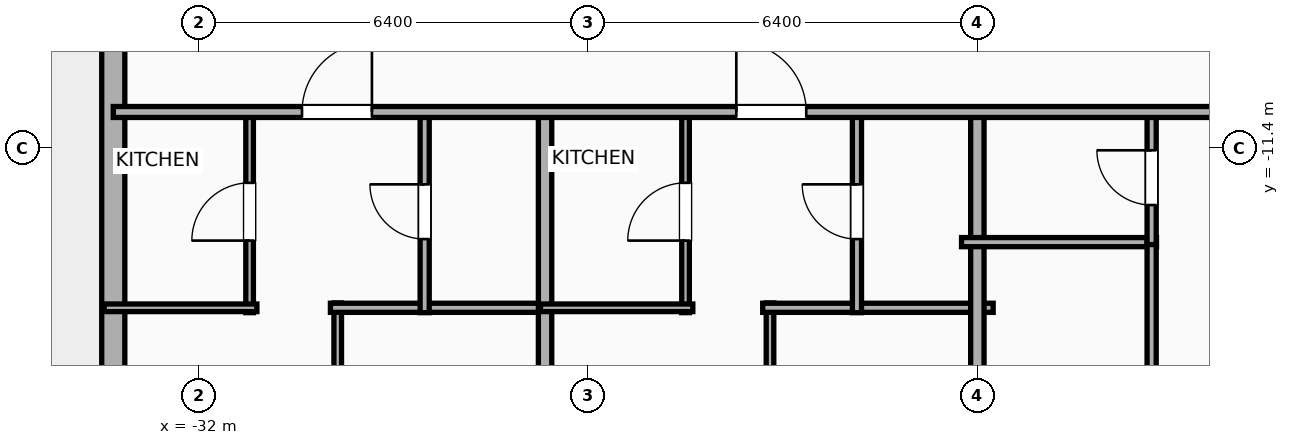
"""IFC4 building model, lengths in metres.
Left out: names, types, materials, properties, quantities, classifications, styles, units other than length and angle.
Written with IfcOpenShell. Run it as: python <this file> out.ifc"""

import sys

from ifc_helpers import new_model, si_unit, direction, frame, frame_2d, origin, place, context, subcontext, project, spatial, rectangle, extrude, element, fill, save


model = new_model("IFC4")
c1 = context("Model", 3, precision=1e-05, world=origin(), true_north=direction((0.0, 1.0)))
c2 = subcontext(c1, "Body", "Model", "MODEL_VIEW")
j1 = project(units=[si_unit("LENGTHUNIT", "METRE"), si_unit("PLANEANGLEUNIT", "RADIAN")], contexts=[c1])
p1 = place(None, origin())
s1 = spatial("IfcSite", under=j1, at=p1, CompositionType="ELEMENT")
p2 = place(p1, origin())
s2 = spatial("IfcBuilding", under=s1, at=p2, CompositionType="ELEMENT")
p3 = place(p2, frame((0.0, 0.0, 53.3)))
s3 = spatial("IfcBuildingStorey", under=s2, at=p3, CompositionType="ELEMENT", Elevation=53.3)
p4 = place(p3, frame((-33.41, -18.381, 0.0), z_axis=(0.0, 0.0, 1.0), x_axis=(0.0, 1.0, 0.0)))
e1 = element("IfcWall", 1, at=p4, inside=s3, PredefinedType="ELEMENTEDWALL", context=c2, shape_type="SweptSolid", body=[
    extrude(rectangle(XDim=36.763, YDim=0.38, at=frame_2d((18.381, 0.0))), origin(), (0.0, 0.0, 1.0), 3.65),
])
p5 = place(p4, frame((17.631, 0.0, 0.0)))
e2 = element("IfcOpeningElement", 2, at=p5, cuts=e1, PredefinedType="OPENING", context=c2, shape_type="SweptSolid", body=[
    extrude(rectangle(XDim=1.5, YDim=2.05, at=frame_2d((0.75, 1.025))), frame((0.0, 0.2, 0.0), z_axis=(0.0, -1.0, 0.0), x_axis=(1.0, 0.0, 0.0)), (0.0, 0.0, 1.0), 0.4),
])
p6 = place(p4, frame((33.207, 0.0, 0.75)))
e3 = element("IfcOpeningElement", 3, at=p6, cuts=e1, PredefinedType="OPENING", context=c2, shape_type="SweptSolid", body=[
    extrude(rectangle(XDim=1.2, YDim=2.05, at=frame_2d((0.6, 1.025))), frame((0.0, 0.2, 0.0), z_axis=(0.0, -1.0, 0.0), x_axis=(1.0, 0.0, 0.0)), (0.0, 0.0, 1.0), 0.4),
])
p7 = place(p3, frame((-29.719, -22.335, 0.0), z_axis=(0.0, 0.0, 1.0), x_axis=(0.0, 1.0, 0.0)))
e4 = element("IfcWall", 4, at=p7, inside=s3, PredefinedType="PARTITIONING", context=c2, shape_type="SweptSolid", body=[
    extrude(rectangle(XDim=8.396, YDim=0.125, at=frame_2d((4.198, 0.0))), origin(), (0.0, 0.0, 1.0), 2.94),
])
p8 = place(p7, frame((5.931, 0.0, 0.0)))
e5 = element("IfcOpeningElement", 5, at=p8, cuts=e4, PredefinedType="OPENING", context=c2, shape_type="SweptSolid", body=[
    extrude(rectangle(XDim=0.9, YDim=2.05, at=frame_2d((0.45, 1.025))), frame((0.0, 0.073, 0.0), z_axis=(0.0, -1.0, 0.0), x_axis=(1.0, 0.0, 0.0)), (0.0, 0.0, 1.0), 0.145),
])
p9 = place(p3, frame((-29.839, -14.02, 0.0), z_axis=(0.0, 0.0, 1.0), x_axis=(1.0, 0.0, 0.0)))
e6 = element("IfcWall", 6, at=p9, inside=s3, PredefinedType="PLUMBINGWALL", context=c2, shape_type="SweptSolid", body=[
    extrude(rectangle(XDim=3.605, YDim=0.15, at=frame_2d((1.803, 0.0))), origin(), (0.0, 0.0, 1.0), 3.65),
])
p10 = place(p3, frame((-31.168, -14.1, 0.0), z_axis=(0.0, 0.0, 1.0), x_axis=(0.0, 1.0, 0.0)))
e7 = element("IfcWall", 7, at=p10, inside=s3, PredefinedType="PARTITIONING", context=c2, shape_type="SweptSolid", body=[
    extrude(rectangle(XDim=3.32, YDim=0.125, at=frame_2d((1.66, 0.0))), origin(), (0.0, 0.0, 1.0), 2.94),
])
p11 = place(p10, frame((1.185, 0.0, 0.0)))
e8 = element("IfcOpeningElement", 8, at=p11, cuts=e7, PredefinedType="OPENING", context=c2, shape_type="SweptSolid", body=[
    extrude(rectangle(XDim=0.95, YDim=2.05, at=frame_2d((0.475, 1.025))), frame((0.0, 0.073, 0.0), z_axis=(0.0, -1.0, 0.0), x_axis=(1.0, 0.0, 0.0)), (0.0, 0.0, 1.0), 0.145),
])
p12 = place(p3, frame((-33.56, -14.02, 0.0), z_axis=(0.0, 0.0, 1.0), x_axis=(1.0, 0.0, 0.0)))
e9 = element("IfcWall", 9, at=p12, inside=s3, PredefinedType="PARTITIONING", context=c2, shape_type="SweptSolid", body=[
    extrude(rectangle(XDim=2.512, YDim=0.125, at=frame_2d((1.256, 0.0))), origin(), (0.0, 0.0, 1.0), 3.65),
])
p13 = place(p3, frame((-28.289, -14.1, 0.0), z_axis=(0.0, 0.0, 1.0), x_axis=(0.0, 1.0, 0.0)))
e10 = element("IfcWall", 10, at=p13, inside=s3, PredefinedType="PLUMBINGWALL", context=c2, shape_type="SweptSolid", body=[
    extrude(rectangle(XDim=3.32, YDim=0.15, at=frame_2d((1.66, 0.0))), origin(), (0.0, 0.0, 1.0), 3.65),
])
p14 = place(p13, frame((1.21, 0.0, 0.0)))
e11 = element("IfcOpeningElement", 11, at=p14, cuts=e10, PredefinedType="OPENING", context=c2, shape_type="SweptSolid", body=[
    extrude(rectangle(XDim=0.9, YDim=2.05, at=frame_2d((0.45, 1.025))), frame((0.0, 0.085, 0.0), z_axis=(0.0, -1.0, 0.0), x_axis=(1.0, 0.0, 0.0)), (0.0, 0.0, 1.0), 0.17),
])
p15 = place(p3, frame((-26.309, -22.21, 0.0), z_axis=(0.0, 0.0, 1.0), x_axis=(0.0, 1.0, 0.0)))
e12 = element("IfcWall", 12, at=p15, inside=s3, PredefinedType="PARTITIONING", context=c2, shape_type="SweptSolid", body=[
    extrude(rectangle(XDim=11.49, YDim=0.22, at=frame_2d((5.745, 0.0))), origin(), (0.0, 0.0, 1.0), 3.65),
])
p16 = place(p3, frame((-22.61, -22.36, 0.0), z_axis=(0.0, 0.0, 1.0), x_axis=(0.0, 1.0, 0.0)))
e13 = element("IfcWall", 13, at=p16, inside=s3, PredefinedType="PARTITIONING", context=c2, shape_type="SweptSolid", body=[
    extrude(rectangle(XDim=8.42, YDim=0.125, at=frame_2d((4.21, 0.0))), origin(), (0.0, 0.0, 1.0), 3.65),
])
p17 = place(p16, frame((5.949, 0.0, 0.0)))
e14 = element("IfcOpeningElement", 14, at=p17, cuts=e13, PredefinedType="OPENING", context=c2, shape_type="SweptSolid", body=[
    extrude(rectangle(XDim=0.9, YDim=2.05, at=frame_2d((0.45, 1.025))), frame((0.0, 0.073, 0.0), z_axis=(0.0, -1.0, 0.0), x_axis=(1.0, 0.0, 0.0)), (0.0, 0.0, 1.0), 0.145),
])
p18 = place(p3, frame((-22.73, -14.02, 0.0), z_axis=(0.0, 0.0, 1.0), x_axis=(1.0, 0.0, 0.0)))
e15 = element("IfcWall", 15, at=p18, inside=s3, PredefinedType="PLUMBINGWALL", context=c2, shape_type="SweptSolid", body=[
    extrude(rectangle(XDim=3.79, YDim=0.15, at=frame_2d((1.895, 0.0))), origin(), (0.0, 0.0, 1.0), 3.65),
])
p19 = place(p3, frame((-23.999, -14.1, 0.0), z_axis=(0.0, 0.0, 1.0), x_axis=(0.0, 1.0, 0.0)))
e16 = element("IfcWall", 16, at=p19, inside=s3, PredefinedType="PARTITIONING", context=c2, shape_type="SweptSolid", body=[
    extrude(rectangle(XDim=3.32, YDim=0.125, at=frame_2d((1.66, 0.0))), origin(), (0.0, 0.0, 1.0), 3.65),
])
p20 = place(p19, frame((1.185, 0.0, 0.0)))
e17 = element("IfcOpeningElement", 17, at=p20, cuts=e16, PredefinedType="OPENING", context=c2, shape_type="SweptSolid", body=[
    extrude(rectangle(XDim=0.95, YDim=2.05, at=frame_2d((0.475, 1.025))), frame((0.0, 0.073, 0.0), z_axis=(0.0, -1.0, 0.0), x_axis=(1.0, 0.0, 0.0)), (0.0, 0.0, 1.0), 0.145),
])
p21 = place(p3, frame((-26.384, -14.02, 0.0), z_axis=(0.0, 0.0, 1.0), x_axis=(1.0, 0.0, 0.0)))
e18 = element("IfcWall", 18, at=p21, inside=s3, PredefinedType="PARTITIONING", context=c2, shape_type="SweptSolid", body=[
    extrude(rectangle(XDim=2.505, YDim=0.125, at=frame_2d((1.252, 0.0))), origin(), (0.0, 0.0, 1.0), 3.65),
])
p22 = place(p3, frame((-21.18, -14.1, 0.0), z_axis=(0.0, 0.0, 1.0), x_axis=(0.0, 1.0, 0.0)))
e19 = element("IfcWall", 19, at=p22, inside=s3, PredefinedType="PLUMBINGWALL", context=c2, shape_type="SweptSolid", body=[
    extrude(rectangle(XDim=3.32, YDim=0.15, at=frame_2d((1.66, 0.0))), origin(), (0.0, 0.0, 1.0), 3.65),
])
p23 = place(p22, frame((1.21, 0.0, 0.0)))
e20 = element("IfcOpeningElement", 20, at=p23, cuts=e19, PredefinedType="OPENING", context=c2, shape_type="SweptSolid", body=[
    extrude(rectangle(XDim=0.9, YDim=2.05, at=frame_2d((0.45, 1.025))), frame((0.0, 0.085, 0.0), z_axis=(0.0, -1.0, 0.0), x_axis=(1.0, 0.0, 0.0)), (0.0, 0.0, 1.0), 0.17),
])
p24 = place(p3, frame((-19.2, -22.21, 0.0), z_axis=(0.0, 0.0, 1.0), x_axis=(0.0, 1.0, 0.0)))
e21 = element("IfcWall", 21, at=p24, inside=s3, PredefinedType="PARTITIONING", context=c2, shape_type="SweptSolid", body=[
    extrude(rectangle(XDim=11.49, YDim=0.22, at=frame_2d((5.745, 0.0))), origin(), (0.0, 0.0, 1.0), 2.94),
])
p25 = place(p3, frame((-19.46, -12.94, 0.0), z_axis=(0.0, 0.0, 1.0), x_axis=(1.0, 0.0, 0.0)))
e22 = element("IfcWall", 22, at=p25, inside=s3, PredefinedType="PLUMBINGWALL", context=c2, shape_type="SweptSolid", body=[
    extrude(rectangle(XDim=3.206, YDim=0.15, at=frame_2d((1.603, 0.0))), origin(), (0.0, 0.0, 1.0), 3.65),
])
p26 = place(p3, frame((-16.334, -22.258, 0.0), z_axis=(0.0, 0.0, 1.0), x_axis=(0.0, 1.0, 0.0)))
e23 = element("IfcWall", 23, at=p26, inside=s3, PredefinedType="PLUMBINGWALL", context=c2, shape_type="SweptSolid", body=[
    extrude(rectangle(XDim=9.358, YDim=0.15, at=frame_2d((4.679, 0.0))), origin(), (0.0, 0.0, 1.0), 3.65),
])
p27 = place(p26, frame((6.288, 0.0, 0.0)))
e24 = element("IfcOpeningElement", 24, at=p27, cuts=e23, PredefinedType="OPENING", context=c2, shape_type="SweptSolid", body=[
    extrude(rectangle(XDim=0.9, YDim=2.05, at=frame_2d((0.45, 1.025))), frame((0.0, 0.085, 0.0), z_axis=(0.0, -1.0, 0.0), x_axis=(1.0, 0.0, 0.0)), (0.0, 0.0, 1.0), 0.17),
])
p28 = place(p3, frame((-16.334, -12.98, 0.0), z_axis=(0.0, 0.0, 1.0), x_axis=(0.0, 1.0, 0.0)))
e25 = element("IfcWall", 25, at=p28, inside=s3, PredefinedType="PLUMBINGWALL", context=c2, shape_type="SweptSolid", body=[
    extrude(rectangle(XDim=2.2, YDim=0.15, at=frame_2d((1.1, 0.0))), origin(), (0.0, 0.0, 1.0), 3.65),
])
p29 = place(p28, frame((0.65, 0.0, 0.0)))
e26 = element("IfcOpeningElement", 26, at=p29, cuts=e25, PredefinedType="OPENING", context=c2, shape_type="SweptSolid", body=[
    extrude(rectangle(XDim=0.9, YDim=2.05, at=frame_2d((0.45, 1.025))), frame((0.0, 0.085, 0.0), z_axis=(0.0, -1.0, 0.0), x_axis=(1.0, 0.0, 0.0)), (0.0, 0.0, 1.0), 0.17),
])
p30 = place(p3, frame((-33.41, -10.8, 0.0), z_axis=(0.0, 0.0, 1.0), x_axis=(1.0, 0.0, 0.0)))
e27 = element("IfcWall", 27, at=p30, inside=s3, PredefinedType="PARTITIONING", context=c2, shape_type="SweptSolid", body=[
    extrude(rectangle(XDim=59.62, YDim=0.18, at=frame_2d((29.81, 0.0))), origin(), (0.0, 0.0, 1.0), 3.65),
])
p31 = place(p30, frame((3.104, 0.0, 0.0)))
e28 = element("IfcOpeningElement", 28, at=p31, cuts=e27, PredefinedType="OPENING", context=c2, shape_type="SweptSolid", body=[
    extrude(rectangle(XDim=1.15, YDim=2.05, at=frame_2d((0.575, 1.025))), frame((0.0, 0.1, 0.0), z_axis=(0.0, -1.0, 0.0), x_axis=(1.0, 0.0, 0.0)), (0.0, 0.0, 1.0), 0.2),
])
p32 = place(p30, frame((10.246, 0.0, 0.0)))
e29 = element("IfcOpeningElement", 29, at=p32, cuts=e27, PredefinedType="OPENING", context=c2, shape_type="SweptSolid", body=[
    extrude(rectangle(XDim=1.15, YDim=2.05, at=frame_2d((0.575, 1.025))), frame((0.0, 0.1, 0.0), z_axis=(0.0, -1.0, 0.0), x_axis=(1.0, 0.0, 0.0)), (0.0, 0.0, 1.0), 0.2),
])
p33 = place(p30, frame((18.336, 0.0, 0.0)))
e30 = element("IfcOpeningElement", 30, at=p33, cuts=e27, PredefinedType="OPENING", context=c2, shape_type="SweptSolid", body=[
    extrude(rectangle(XDim=1.15, YDim=2.05, at=frame_2d((0.575, 1.025))), frame((0.0, 0.1, 0.0), z_axis=(0.0, -1.0, 0.0), x_axis=(1.0, 0.0, 0.0)), (0.0, 0.0, 1.0), 0.2),
])
p34 = place(p30, frame((28.287, 0.0, 0.0)))
e31 = element("IfcOpeningElement", 31, at=p34, cuts=e27, PredefinedType="OPENING", context=c2, shape_type="SweptSolid", body=[
    extrude(rectangle(XDim=1.15, YDim=2.05, at=frame_2d((0.575, 1.025))), frame((0.0, 0.1, 0.0), z_axis=(0.0, -1.0, 0.0), x_axis=(1.0, 0.0, 0.0)), (0.0, 0.0, 1.0), 0.2),
])
p35 = place(p30, frame((37.653, 0.0, 0.0)))
e32 = element("IfcOpeningElement", 32, at=p35, cuts=e27, PredefinedType="OPENING", context=c2, shape_type="SweptSolid", body=[
    extrude(rectangle(XDim=1.15, YDim=2.05, at=frame_2d((0.575, 1.025))), frame((0.0, 0.1, 0.0), z_axis=(0.0, -1.0, 0.0), x_axis=(1.0, 0.0, 0.0)), (0.0, 0.0, 1.0), 0.2),
])
p36 = place(p30, frame((47.604, 0.0, 0.0)))
e33 = element("IfcOpeningElement", 33, at=p36, cuts=e27, PredefinedType="OPENING", context=c2, shape_type="SweptSolid", body=[
    extrude(rectangle(XDim=1.15, YDim=2.05, at=frame_2d((0.575, 1.025))), frame((0.0, 0.1, 0.0), z_axis=(0.0, -1.0, 0.0), x_axis=(1.0, 0.0, 0.0)), (0.0, 0.0, 1.0), 0.2),
])
p37 = place(p30, frame((55.736, 0.0, 0.0)))
e34 = element("IfcOpeningElement", 34, at=p37, cuts=e27, PredefinedType="OPENING", context=c2, shape_type="SweptSolid", body=[
    extrude(rectangle(XDim=1.15, YDim=2.05, at=frame_2d((0.575, 1.025))), frame((0.0, 0.1, 0.0), z_axis=(0.0, -1.0, 0.0), x_axis=(1.0, 0.0, 0.0)), (0.0, 0.0, 1.0), 0.2),
])
p38 = place(p11, origin())
e35 = element("IfcDoor", 35, at=p38, inside=s3, OperationType="SINGLE_SWING_LEFT", PredefinedType="DOOR", context=c2, shape_type="SweptSolid", body=[
    extrude(rectangle(XDim=0.95, YDim=2.05, at=frame_2d((0.475, 1.025))), frame((0.0, 0.025, 0.0), z_axis=(0.0, -1.0, 0.0), x_axis=(1.0, 0.0, 0.0)), (0.0, 0.0, 1.0), 0.05),
])
fill(e8, e35)
p39 = place(p14, origin())
e36 = element("IfcDoor", 36, at=p39, inside=s3, OperationType="SINGLE_SWING_RIGHT", PredefinedType="DOOR", context=c2, shape_type="SweptSolid", body=[
    extrude(rectangle(XDim=0.9, YDim=2.05, at=frame_2d((0.45, 1.025))), frame((0.0, 0.025, 0.0), z_axis=(0.0, -1.0, 0.0), x_axis=(1.0, 0.0, 0.0)), (0.0, 0.0, 1.0), 0.05),
])
fill(e11, e36)
p40 = place(p20, origin())
e37 = element("IfcDoor", 37, at=p40, inside=s3, OperationType="SINGLE_SWING_LEFT", PredefinedType="DOOR", context=c2, shape_type="SweptSolid", body=[
    extrude(rectangle(XDim=0.95, YDim=2.05, at=frame_2d((0.475, 1.025))), frame((0.0, 0.025, 0.0), z_axis=(0.0, -1.0, 0.0), x_axis=(1.0, 0.0, 0.0)), (0.0, 0.0, 1.0), 0.05),
])
fill(e17, e37)
p41 = place(p23, origin())
e38 = element("IfcDoor", 38, at=p41, inside=s3, OperationType="SINGLE_SWING_RIGHT", PredefinedType="DOOR", context=c2, shape_type="SweptSolid", body=[
    extrude(rectangle(XDim=0.9, YDim=2.05, at=frame_2d((0.45, 1.025))), frame((0.0, 0.025, 0.0), z_axis=(0.0, -1.0, 0.0), x_axis=(1.0, 0.0, 0.0)), (0.0, 0.0, 1.0), 0.05),
])
fill(e20, e38)
p42 = place(p29, origin())
e39 = element("IfcDoor", 39, at=p42, inside=s3, OperationType="SINGLE_SWING_RIGHT", PredefinedType="DOOR", context=c2, shape_type="SweptSolid", body=[
    extrude(rectangle(XDim=0.9, YDim=2.05, at=frame_2d((0.45, 1.025))), frame((0.0, 0.025, 0.0), z_axis=(0.0, -1.0, 0.0), x_axis=(1.0, 0.0, 0.0)), (0.0, 0.0, 1.0), 0.05),
])
fill(e26, e39)
p43 = place(p31, origin())
e40 = element("IfcDoor", 40, at=p43, inside=s3, OperationType="SINGLE_SWING_RIGHT", PredefinedType="DOOR", context=c2, shape_type="SweptSolid", body=[
    extrude(rectangle(XDim=1.15, YDim=2.05, at=frame_2d((0.575, 1.025))), frame((0.0, 0.025, 0.0), z_axis=(0.0, -1.0, 0.0), x_axis=(1.0, 0.0, 0.0)), (0.0, 0.0, 1.0), 0.05),
])
fill(e28, e40)
p44 = place(p32, origin())
e41 = element("IfcDoor", 41, at=p44, inside=s3, OperationType="SINGLE_SWING_LEFT", PredefinedType="DOOR", context=c2, shape_type="SweptSolid", body=[
    extrude(rectangle(XDim=1.15, YDim=2.05, at=frame_2d((0.575, 1.025))), frame((0.0, 0.025, 0.0), z_axis=(0.0, -1.0, 0.0), x_axis=(1.0, 0.0, 0.0)), (0.0, 0.0, 1.0), 0.05),
])
fill(e29, e41)
save(model, sys.argv[1])
